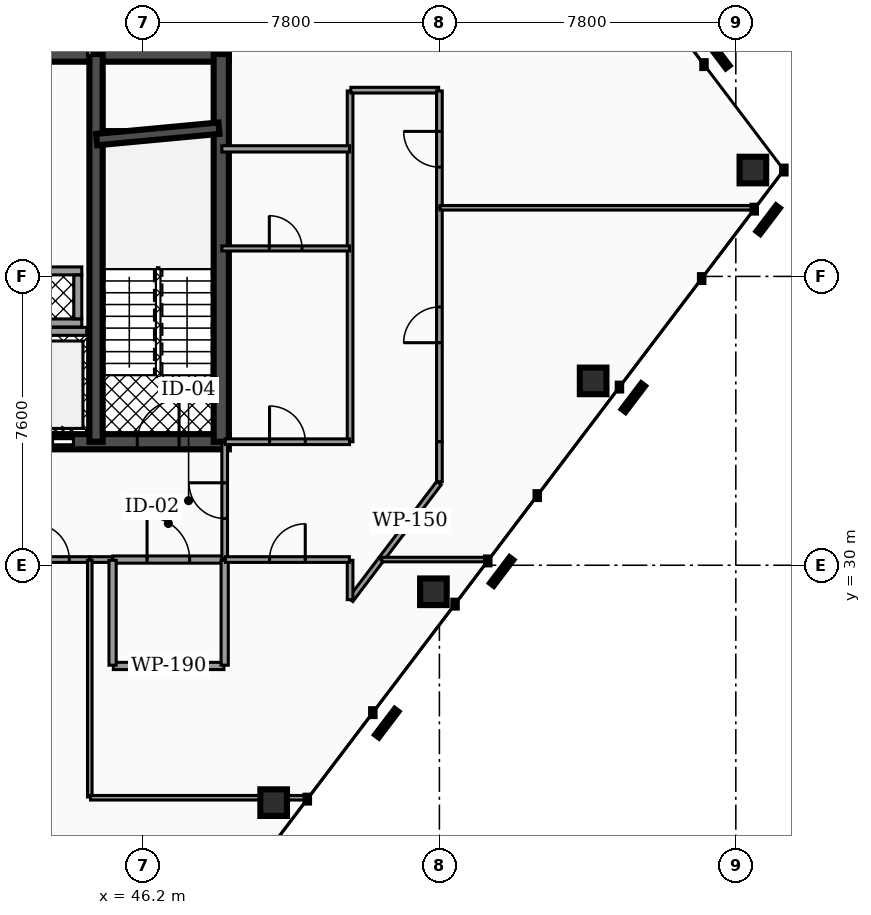
"""IFC4 building model, lengths in metres.
Left out: names, types, materials, properties, quantities, classifications, styles, units other than length and angle.
Written with IfcOpenShell. Run it as: python <this file> out.ifc"""

import sys

from ifc_helpers import new_model, si_unit, direction, frame, frame_2d, origin, origin_2d, place, context, subcontext, project, spatial, rectangle, hollow_rectangle, extrude, element, fill, save


model = new_model("IFC4")
c1 = context("Model", 3, precision=1e-05, world=origin(), true_north=direction((0.0, 1.0)))
c2 = subcontext(c1, "Body", "Model", "MODEL_VIEW")
j1 = project(units=[si_unit("LENGTHUNIT", "METRE"), si_unit("PLANEANGLEUNIT", "RADIAN")], contexts=[c1])
p1 = place(None, origin())
s1 = spatial("IfcSite", under=j1, at=p1, CompositionType="ELEMENT")
p2 = place(p1, origin())
s2 = spatial("IfcBuilding", under=s1, at=p2, CompositionType="ELEMENT")
p3 = place(p2, frame((0.0, 0.0, 183.26)))
s3 = spatial("IfcBuildingStorey", under=s2, at=p3, CompositionType="ELEMENT", Elevation=183.26)
p4 = place(p3, frame((28.4, 43.45, 0.0), z_axis=(0.0, 0.0, 1.0), x_axis=(1.0, 0.0, 0.0)))
e1 = element("IfcWall", 1, at=p4, inside=s3, PredefinedType="SHEAR", context=c2, shape_type="SweptSolid", body=[
    extrude(rectangle(XDim=20.06, YDim=0.4, at=frame_2d((10.03, 0.0))), origin(), (0.0, 0.0, 1.0), 3.5),
])
p5 = place(p3, frame((28.4, 33.25, 0.0), z_axis=(0.0, 0.0, 1.0), x_axis=(1.0, 0.0, 0.0)))
e2 = element("IfcWall", 2, at=p5, inside=s3, PredefinedType="SHEAR", context=c2, shape_type="SweptSolid", body=[
    extrude(rectangle(XDim=20.06, YDim=0.4, at=frame_2d((10.03, 0.0))), origin(), (0.0, 0.0, 1.0), 3.5),
])
p6 = place(p5, frame((4.03, 0.0, 0.0)))
e3 = element("IfcOpeningElement", 3, at=p6, cuts=e2, PredefinedType="OPENING", context=c2, shape_type="SweptSolid", body=[
    extrude(rectangle(XDim=1.1, YDim=2.15, at=frame_2d((0.55, 1.075))), frame((0.0, 0.21, 0.0), z_axis=(0.0, -1.0, 0.0), x_axis=(1.0, 0.0, 0.0)), (0.0, 0.0, 1.0), 0.42),
])
p7 = place(p5, frame((14.87, 0.0, 0.0)))
e4 = element("IfcOpeningElement", 4, at=p7, cuts=e2, PredefinedType="OPENING", context=c2, shape_type="SweptSolid", body=[
    extrude(rectangle(XDim=1.1, YDim=2.15, at=frame_2d((0.55, 1.075))), frame((0.0, 0.21, 0.0), z_axis=(0.0, -1.0, 0.0), x_axis=(1.0, 0.0, 0.0)), (0.0, 0.0, 1.0), 0.42),
])
p8 = place(p5, frame((5.95, 0.0, 0.0)))
e5 = element("IfcOpeningElement", 5, at=p8, cuts=e2, PredefinedType="OPENING", context=c2, shape_type="SweptSolid", body=[
    extrude(rectangle(XDim=1.0, YDim=2.1, at=frame_2d((0.5, 1.05))), frame((0.0, 0.21, 0.0), z_axis=(0.0, -1.0, 0.0), x_axis=(1.0, 0.0, 0.0)), (0.0, 0.0, 1.0), 0.42),
])
p9 = place(p5, frame((7.65, 0.0, 0.0)))
e6 = element("IfcOpeningElement", 6, at=p9, cuts=e2, PredefinedType="OPENING", context=c2, shape_type="SweptSolid", body=[
    extrude(rectangle(XDim=1.0, YDim=2.1, at=frame_2d((0.5, 1.05))), frame((0.0, 0.21, 0.0), z_axis=(0.0, -1.0, 0.0), x_axis=(1.0, 0.0, 0.0)), (0.0, 0.0, 1.0), 0.42),
])
p10 = place(p5, frame((1.31, 0.0, 0.0)))
e7 = element("IfcOpeningElement", 7, at=p10, cuts=e2, PredefinedType="OPENING", context=c2, shape_type="SweptSolid", body=[
    extrude(rectangle(XDim=1.1, YDim=2.2, at=frame_2d((0.55, 1.1))), frame((0.0, 0.21, 0.0), z_axis=(0.0, -1.0, 0.0), x_axis=(1.0, 0.0, 0.0)), (0.0, 0.0, 1.0), 0.42),
])
p11 = place(p5, frame((9.44, 0.0, 0.0)))
e8 = element("IfcOpeningElement", 8, at=p11, cuts=e2, PredefinedType="OPENING", context=c2, shape_type="SweptSolid", body=[
    extrude(rectangle(XDim=1.12, YDim=2.05, at=frame_2d((0.56, 1.025))), frame((0.0, 0.21, 0.0), z_axis=(0.0, -1.0, 0.0), x_axis=(1.0, 0.0, 0.0)), (0.0, 0.0, 1.0), 0.42),
])
p12 = place(p5, frame((17.65, 0.0, 0.0)))
e9 = element("IfcOpeningElement", 9, at=p12, cuts=e2, PredefinedType="OPENING", context=c2, shape_type="SweptSolid", body=[
    extrude(rectangle(XDim=1.1, YDim=2.2, at=frame_2d((0.55, 1.1))), frame((0.0, 0.21, 0.0), z_axis=(0.0, -1.0, 0.0), x_axis=(1.0, 0.0, 0.0)), (0.0, 0.0, 1.0), 0.42),
])
p13 = place(p3, frame((44.965, 33.25, 0.0), z_axis=(0.0, 0.0, 1.0), x_axis=(0.0, 1.0, 0.0)))
e10 = element("IfcWall", 10, at=p13, inside=s3, PredefinedType="SHEAR", context=c2, shape_type="SweptSolid", body=[
    extrude(rectangle(XDim=10.2, YDim=0.35, at=frame_2d((5.1, 0.0))), origin(), (0.0, 0.0, 1.0), 3.5),
])
p14 = place(p3, frame((48.26, 33.25, 0.0), z_axis=(0.0, 0.0, 1.0), x_axis=(0.0, 1.0, 0.0)))
e11 = element("IfcWall", 11, at=p14, inside=s3, PredefinedType="SHEAR", context=c2, shape_type="SweptSolid", body=[
    extrude(rectangle(XDim=10.2, YDim=0.4, at=frame_2d((5.1, 0.0))), origin(), (0.0, 0.0, 1.0), 3.5),
])
p15 = place(p3, frame((44.98, 41.2, 0.0), z_axis=(0.0, 0.0, 1.0), x_axis=(0.995686468965, 0.09278176286, 0.0)))
e12 = element("IfcWall", 12, at=p15, inside=s3, PredefinedType="SHEAR", context=c2, shape_type="SweptSolid", body=[
    extrude(rectangle(XDim=3.234, YDim=0.3, at=frame_2d((1.617, 0.0))), origin(), (0.0, 0.0, 1.0), 3.5),
])
p16 = place(p3, frame((49.639, 23.754, 0.0), z_axis=(-0.074246461294, 0.034968136733, 0.996626656476), x_axis=(-0.426082575566, -0.904684275755, 0.0)))
e13 = element("IfcColumn", 13, at=p16, inside=s3, PredefinedType="COLUMN", context=c2, shape_type="SweptSolid", body=[
    extrude(hollow_rectangle(XDim=0.7, YDim=0.7, WallThickness=0.035, at=origin_2d()), origin(), (0.0, 0.0, 1.0), 3.512),
])
p17 = place(p3, frame((53.842, 29.302, 0.0), z_axis=(-0.055061357393, 0.060205979169, 0.99666618634), x_axis=(-0.737931809489, -0.674875280733, 0.0)))
e14 = element("IfcColumn", 14, at=p17, inside=s3, PredefinedType="COLUMN", context=c2, shape_type="SweptSolid", body=[
    extrude(hollow_rectangle(XDim=0.7, YDim=0.7, WallThickness=0.035, at=origin_2d()), origin(), (0.0, 0.0, 1.0), 3.512),
])
p18 = place(p3, frame((58.045, 34.851, 0.0), z_axis=(-0.035907879203, 0.085428803519, 0.995697014026), x_axis=(-0.921875036522, -0.387487312099, 0.0)))
e15 = element("IfcColumn", 15, at=p18, inside=s3, PredefinedType="COLUMN", context=c2, shape_type="SweptSolid", body=[
    extrude(hollow_rectangle(XDim=0.7, YDim=0.7, WallThickness=0.035, at=origin_2d()), origin(), (0.0, 0.0, 1.0), 3.515),
])
p19 = place(p3, frame((62.249, 40.399, 0.0), z_axis=(-0.01670553271, 0.110492195599, 0.993736584759), x_axis=(-0.988762784989, -0.149492993214, 0.0)))
e16 = element("IfcColumn", 16, at=p19, inside=s3, PredefinedType="COLUMN", context=c2, shape_type="SweptSolid", body=[
    extrude(hollow_rectangle(XDim=0.7, YDim=0.7, WallThickness=0.035, at=origin_2d()), origin(), (0.0, 0.0, 1.0), 3.522),
])
p20 = place(p3, frame((42.92, 36.155, 0.0), z_axis=(0.0, 0.0, 1.0), x_axis=(1.0, 0.0, 0.0)))
e17 = element("IfcWall", 17, at=p20, inside=s3, PredefinedType="SOLIDWALL", context=c2, shape_type="SweptSolid", body=[
    extrude(rectangle(XDim=1.8, YDim=0.21, at=frame_2d((0.9, 0.0))), origin(), (0.0, 0.0, 1.0), 2.472),
])
for number, where, z_axis, x_axis in (
    (18, (42.99, 36.375, 0.0), (0.0, 0.0, 1.0), (1.0, 0.0, 0.0)),
    (19, (42.99, 37.745, 0.0), (0.0, 0.0, 1.0), (1.0, 0.0, 0.0)),
):
    element("IfcWall", number, at=place(p3, frame(where, z_axis=z_axis, x_axis=x_axis)), inside=s3, PredefinedType="SOLIDWALL", context=c2, shape_type="SweptSolid", body=[
        extrude(rectangle(XDim=1.6, YDim=0.21, at=frame_2d((0.8, 0.0))), origin(), (0.0, 0.0, 1.0), 3.5),
    ])
p21 = place(p3, frame((44.485, 36.485, 0.0), z_axis=(0.0, 0.0, 1.0), x_axis=(0.0, 1.0, 0.0)))
e20 = element("IfcWall", 20, at=p21, inside=s3, PredefinedType="SOLIDWALL", context=c2, shape_type="SweptSolid", body=[
    extrude(rectangle(XDim=1.15, YDim=0.21, at=frame_2d((0.575, 0.0))), origin(), (0.0, 0.0, 1.0), 3.5),
])
p22 = place(p3, frame((45.405, 30.15, 0.0), z_axis=(0.0, 0.0, 1.0), x_axis=(1.0, 0.0, 0.0)))
e21 = element("IfcWall", 21, at=p22, inside=s3, PredefinedType="PARTITIONING", context=c2, shape_type="SweptSolid", body=[
    extrude(rectangle(XDim=2.925, YDim=0.19, at=frame_2d((1.462, 0.0))), origin(), (0.0, 0.0, 1.0), 2.457),
])
p23 = place(p22, frame((0.903, 0.0, 0.0)))
e22 = element("IfcOpeningElement", 22, at=p23, cuts=e21, PredefinedType="OPENING", context=c2, shape_type="SweptSolid", body=[
    extrude(rectangle(XDim=1.12, YDim=2.05, at=frame_2d((0.56, 1.025))), frame((0.0, 0.105, 0.0), z_axis=(0.0, -1.0, 0.0), x_axis=(1.0, 0.0, 0.0)), (0.0, 0.0, 1.0), 0.21),
])
p24 = place(p3, frame((48.35, 30.17, 0.0), z_axis=(0.0, 0.0, 1.0), x_axis=(0.0, 1.0, 0.0)))
e23 = element("IfcWall", 23, at=p24, inside=s3, PredefinedType="PARTITIONING", context=c2, shape_type="SweptSolid", body=[
    extrude(rectangle(XDim=3.06, YDim=0.15, at=frame_2d((1.53, 0.0))), origin(), (0.0, 0.0, 1.0), 2.457),
])
p25 = place(p24, frame((1.06, 0.0, 0.0)))
e24 = element("IfcOpeningElement", 24, at=p25, cuts=e23, PredefinedType="OPENING", context=c2, shape_type="SweptSolid", body=[
    extrude(rectangle(XDim=0.94, YDim=2.05, at=frame_2d((0.47, 1.025))), frame((0.0, 0.085, 0.0), z_axis=(0.0, -1.0, 0.0), x_axis=(1.0, 0.0, 0.0)), (0.0, 0.0, 1.0), 0.17),
])
p26 = place(p3, frame((35.985, 30.15, 0.0), z_axis=(0.0, 0.0, 1.0), x_axis=(1.0, 0.0, 0.0)))
e25 = element("IfcWall", 25, at=p26, inside=s3, PredefinedType="PARTITIONING", context=c2, shape_type="SweptSolid", body=[
    extrude(rectangle(XDim=8.81, YDim=0.15, at=frame_2d((4.405, 0.0))), origin(), (0.0, 0.0, 1.0), 2.457),
])
p27 = place(p26, frame((7.335, 0.0, 0.0)))
e26 = element("IfcOpeningElement", 26, at=p27, cuts=e25, PredefinedType="OPENING", context=c2, shape_type="SweptSolid", body=[
    extrude(rectangle(XDim=0.94, YDim=2.05, at=frame_2d((0.47, 1.025))), frame((0.0, 0.085, 0.0), z_axis=(0.0, -1.0, 0.0), x_axis=(1.0, 0.0, 0.0)), (0.0, 0.0, 1.0), 0.17),
])
p28 = place(p3, frame((44.805, 30.15, 0.0), z_axis=(0.0, 0.0, 1.0), x_axis=(1.0, 0.0, 0.0)))
e27 = element("IfcWall", 27, at=p28, inside=s3, PredefinedType="PARTITIONING", context=c2, shape_type="SweptSolid", body=[
    extrude(rectangle(XDim=0.59, YDim=0.15, at=frame_2d((0.295, 0.0))), origin(), (0.0, 0.0, 1.0), 2.457),
])
p29 = place(p3, frame((45.42, 27.35, 0.0), z_axis=(0.0, 0.0, 1.0), x_axis=(1.0, 0.0, 0.0)))
e28 = element("IfcWall", 28, at=p29, inside=s3, PredefinedType="PARTITIONING", context=c2, shape_type="SweptSolid", body=[
    extrude(rectangle(XDim=2.91, YDim=0.19, at=frame_2d((1.455, 0.0))), origin(), (0.0, 0.0, 1.0), 2.457),
])
for number, where, z_axis, x_axis in (
    (29, (45.4, 27.37, 0.0), (0.0, 0.0, 1.0), (0.0, 1.0, 0.0)),
    (30, (48.35, 27.37, 0.0), (0.0, 0.0, 1.0), (0.0, 1.0, 0.0)),
):
    element("IfcWall", number, at=place(p3, frame(where, z_axis=z_axis, x_axis=x_axis)), inside=s3, PredefinedType="PARTITIONING", context=c2, shape_type="SweptSolid", body=[
        extrude(rectangle(XDim=2.76, YDim=0.19, at=frame_2d((1.38, 0.0))), origin(), (0.0, 0.0, 1.0), 2.457),
    ])
p30 = place(p3, frame((51.662, 29.091, 0.0), z_axis=(0.0, 0.0, 1.0), x_axis=(0.603847067363, 0.797100193976, 0.0)))
e31 = element("IfcWall", 31, at=p30, inside=s3, PredefinedType="PARTITIONING", context=c2, shape_type="SweptSolid", body=[
    extrude(rectangle(XDim=1.328, YDim=0.15, at=frame_2d((0.664, 0.0))), origin(), (0.0, 0.0, 1.0), 2.457),
])
p31 = place(p3, frame((51.65, 29.095, 0.0), z_axis=(0.0, 0.0, 1.0), x_axis=(0.0, 1.0, 0.0)))
e32 = element("IfcWall", 32, at=p31, inside=s3, PredefinedType="PARTITIONING", context=c2, shape_type="SweptSolid", body=[
    extrude(rectangle(XDim=1.035, YDim=0.15, at=frame_2d((0.518, 0.0))), origin(), (0.0, 0.0, 1.0), 2.457),
])
p32 = place(p3, frame((48.37, 30.15, 0.0), z_axis=(0.0, 0.0, 1.0), x_axis=(1.0, 0.0, 0.0)))
e33 = element("IfcWall", 33, at=p32, inside=s3, PredefinedType="PARTITIONING", context=c2, shape_type="SweptSolid", body=[
    extrude(rectangle(XDim=3.26, YDim=0.15, at=frame_2d((1.63, 0.0))), origin(), (0.0, 0.0, 1.0), 2.457),
])
p33 = place(p32, frame((1.16, 0.0, 0.0)))
e34 = element("IfcOpeningElement", 34, at=p33, cuts=e33, PredefinedType="OPENING", context=c2, shape_type="SweptSolid", body=[
    extrude(rectangle(XDim=0.94, YDim=2.05, at=frame_2d((0.47, 1.025))), frame((0.0, 0.085, 0.0), z_axis=(0.0, -1.0, 0.0), x_axis=(1.0, 0.0, 0.0)), (0.0, 0.0, 1.0), 0.17),
])
p34 = place(p3, frame((54.0, 33.25, 0.0), z_axis=(0.0, 0.0, 1.0), x_axis=(0.0, 1.0, 0.0)))
e35 = element("IfcWall", 35, at=p34, inside=s3, PredefinedType="PARTITIONING", context=c2, shape_type="SweptSolid", body=[
    extrude(rectangle(XDim=6.151, YDim=0.15, at=frame_2d((3.076, 0.0))), origin(), (0.0, 0.0, 1.0), 2.457),
])
p35 = place(p34, frame((2.606, 0.0, 0.0)))
e36 = element("IfcOpeningElement", 36, at=p35, cuts=e35, PredefinedType="OPENING", context=c2, shape_type="SweptSolid", body=[
    extrude(rectangle(XDim=0.94, YDim=2.05, at=frame_2d((0.47, 1.025))), frame((0.0, 0.085, 0.0), z_axis=(0.0, -1.0, 0.0), x_axis=(1.0, 0.0, 0.0)), (0.0, 0.0, 1.0), 0.17),
])
p36 = place(p3, frame((54.0, 32.197, 0.0), z_axis=(0.0, 0.0, 1.0), x_axis=(0.0, 1.0, 0.0)))
e37 = element("IfcWall", 37, at=p36, inside=s3, PredefinedType="PARTITIONING", context=c2, shape_type="SweptSolid", body=[
    extrude(rectangle(XDim=1.053, YDim=0.15, at=frame_2d((0.527, 0.0))), origin(), (0.0, 0.0, 1.0), 2.457),
])
p37 = place(p3, frame((52.468, 30.154, 0.0), z_axis=(0.0, 0.0, 1.0), x_axis=(0.603840884766, 0.797104877594, 0.0)))
e38 = element("IfcWall", 38, at=p37, inside=s3, PredefinedType="PARTITIONING", context=c2, shape_type="SweptSolid", body=[
    extrude(rectangle(XDim=2.518, YDim=0.15, at=frame_2d((1.259, 0.0))), origin(), (0.0, 0.0, 1.0), 2.457),
])
p38 = place(p3, frame((51.65, 33.25, 0.0), z_axis=(0.0, 0.0, 1.0), x_axis=(0.0, 1.0, 0.0)))
e39 = element("IfcWall", 39, at=p38, inside=s3, PredefinedType="PARTITIONING", context=c2, shape_type="SweptSolid", body=[
    extrude(rectangle(XDim=9.23, YDim=0.15, at=frame_2d((4.615, 0.0))), origin(), (0.0, 0.0, 1.0), 2.457),
])
p39 = place(p3, frame((51.67, 42.5, 0.0), z_axis=(0.0, 0.0, 1.0), x_axis=(1.0, 0.0, 0.0)))
e40 = element("IfcWall", 40, at=p39, inside=s3, PredefinedType="PARTITIONING", context=c2, shape_type="SweptSolid", body=[
    extrude(rectangle(XDim=2.31, YDim=0.15, at=frame_2d((1.155, 0.0))), origin(), (0.0, 0.0, 1.0), 2.457),
])
p40 = place(p3, frame((54.0, 39.411, 0.0), z_axis=(0.0, 0.0, 1.0), x_axis=(0.0, 1.0, 0.0)))
e41 = element("IfcWall", 41, at=p40, inside=s3, PredefinedType="PARTITIONING", context=c2, shape_type="SweptSolid", body=[
    extrude(rectangle(XDim=3.069, YDim=0.15, at=frame_2d((1.534, 0.0))), origin(), (0.0, 0.0, 1.0), 2.457),
])
p41 = place(p40, frame((1.064, 0.0, 0.0)))
e42 = element("IfcOpeningElement", 42, at=p41, cuts=e41, PredefinedType="OPENING", context=c2, shape_type="SweptSolid", body=[
    extrude(rectangle(XDim=0.94, YDim=2.05, at=frame_2d((0.47, 1.025))), frame((0.0, 0.085, 0.0), z_axis=(0.0, -1.0, 0.0), x_axis=(1.0, 0.0, 0.0)), (0.0, 0.0, 1.0), 0.17),
])
p42 = place(p3, frame((48.365, 33.25, 0.0), z_axis=(0.0, 0.0, 1.0), x_axis=(1.0, 0.0, 0.0)))
e43 = element("IfcWall", 43, at=p42, inside=s3, PredefinedType="PARTITIONING", context=c2, shape_type="SweptSolid", body=[
    extrude(rectangle(XDim=3.27, YDim=0.15, at=frame_2d((1.635, 0.0))), origin(), (0.0, 0.0, 1.0), 2.457),
])
p43 = place(p42, frame((1.165, 0.0, 0.0)))
e44 = element("IfcOpeningElement", 44, at=p43, cuts=e43, PredefinedType="OPENING", context=c2, shape_type="SweptSolid", body=[
    extrude(rectangle(XDim=0.94, YDim=2.05, at=frame_2d((0.47, 1.025))), frame((0.0, 0.085, 0.0), z_axis=(0.0, -1.0, 0.0), x_axis=(1.0, 0.0, 0.0)), (0.0, 0.0, 1.0), 0.17),
])
p44 = place(p3, frame((44.8, 23.903, 0.0), z_axis=(0.0, 0.0, 1.0), x_axis=(0.0, 1.0, 0.0)))
e45 = element("IfcWall", 45, at=p44, inside=s3, PredefinedType="PARTITIONING", context=c2, shape_type="SweptSolid", body=[
    extrude(rectangle(XDim=6.227, YDim=0.12, at=frame_2d((3.114, 0.0))), origin(), (0.0, 0.0, 1.0), 2.457),
])
p45 = place(p3, frame((44.82, 23.883, 0.0), z_axis=(0.0, 0.0, 1.0), x_axis=(1.0, 0.0, 0.0)))
e46 = element("IfcWall", 46, at=p45, inside=s3, PredefinedType="PARTITIONING", context=c2, shape_type="SweptSolid", body=[
    extrude(rectangle(XDim=5.717, YDim=0.12, at=frame_2d((2.858, 0.0))), origin(), (0.0, 0.0, 1.0), 2.457),
])
p46 = place(p3, frame((44.8, 43.415, 0.0), z_axis=(0.0, 0.0, 1.0), x_axis=(0.0, 1.0, 0.0)))
e47 = element("IfcWall", 47, at=p46, inside=s3, PredefinedType="PARTITIONING", context=c2, shape_type="SweptSolid", body=[
    extrude(rectangle(XDim=3.092, YDim=0.12, at=frame_2d((1.546, 0.0))), origin(), (0.0, 0.0, 1.0), 2.457),
])
p47 = place(p3, frame((52.485, 30.15, 0.0), z_axis=(0.0, 0.0, 1.0), x_axis=(1.0, 0.0, 0.0)))
e48 = element("IfcWall", 48, at=p47, inside=s3, PredefinedType="PARTITIONING", context=c2, shape_type="SweptSolid", body=[
    extrude(rectangle(XDim=2.8, YDim=0.12, at=frame_2d((1.4, 0.0))), origin(), (0.0, 0.0, 1.0), 2.457),
])
p48 = place(p3, frame((54.02, 39.406, 0.0), z_axis=(0.0, 0.0, 1.0), x_axis=(1.0, 0.0, 0.0)))
e49 = element("IfcWall", 49, at=p48, inside=s3, PredefinedType="PARTITIONING", context=c2, shape_type="SweptSolid", body=[
    extrude(rectangle(XDim=8.277, YDim=0.12, at=frame_2d((4.139, 0.0))), origin(), (0.0, 0.0, 1.0), 2.457),
])
p49 = place(p3, frame((48.275, 40.956, 0.0), z_axis=(0.0, 0.0, 1.0), x_axis=(1.0, 0.0, 0.0)))
e50 = element("IfcWall", 50, at=p49, inside=s3, PredefinedType="PARTITIONING", context=c2, shape_type="SweptSolid", body=[
    extrude(rectangle(XDim=3.36, YDim=0.165, at=frame_2d((1.68, 0.0))), origin(), (0.0, 0.0, 1.0), 2.457),
])
p50 = place(p3, frame((48.275, 38.336, 0.0), z_axis=(0.0, 0.0, 1.0), x_axis=(1.0, 0.0, 0.0)))
e51 = element("IfcWall", 51, at=p50, inside=s3, PredefinedType="PARTITIONING", context=c2, shape_type="SweptSolid", body=[
    extrude(rectangle(XDim=3.36, YDim=0.135, at=frame_2d((1.68, 0.0))), origin(), (0.0, 0.0, 1.0), 2.457),
])
p51 = place(p50, frame((1.25, 0.0, 0.0)))
e52 = element("IfcOpeningElement", 52, at=p51, cuts=e51, PredefinedType="OPENING", context=c2, shape_type="SweptSolid", body=[
    extrude(rectangle(XDim=0.86, YDim=2.05, at=frame_2d((0.43, 1.025))), frame((0.0, 0.077, 0.0), z_axis=(0.0, -1.0, 0.0), x_axis=(1.0, 0.0, 0.0)), (0.0, 0.0, 1.0), 0.155),
])
p52 = place(p7, origin())
e53 = element("IfcDoor", 53, at=p52, inside=s3, OperationType="SLIDING_TO_RIGHT", PredefinedType="DOOR", context=c2, shape_type="SweptSolid", body=[
    extrude(rectangle(XDim=1.1, YDim=2.15, at=frame_2d((0.55, 1.075))), frame((0.0, 0.025, 0.0), z_axis=(0.0, -1.0, 0.0), x_axis=(1.0, 0.0, 0.0)), (0.0, 0.0, 1.0), 0.05),
])
fill(e4, e53)
p53 = place(p12, origin())
e54 = element("IfcDoor", 54, at=p53, inside=s3, OperationType="SINGLE_SWING_RIGHT", PredefinedType="DOOR", context=c2, shape_type="SweptSolid", body=[
    extrude(rectangle(XDim=1.1, YDim=2.2, at=frame_2d((0.55, 1.1))), frame((0.0, 0.025, 0.0), z_axis=(0.0, -1.0, 0.0), x_axis=(1.0, 0.0, 0.0)), (0.0, 0.0, 1.0), 0.05),
])
fill(e9, e54)
p54 = place(p23, origin())
e55 = element("IfcDoor", 55, at=p54, inside=s3, OperationType="SINGLE_SWING_LEFT", PredefinedType="DOOR", context=c2, shape_type="SweptSolid", body=[
    extrude(rectangle(XDim=1.12, YDim=2.05, at=frame_2d((0.56, 1.025))), frame((0.0, 0.025, 0.0), z_axis=(0.0, -1.0, 0.0), x_axis=(1.0, 0.0, 0.0)), (0.0, 0.0, 1.0), 0.05),
])
fill(e22, e55)
p55 = place(p25, origin())
e56 = element("IfcDoor", 56, at=p55, inside=s3, OperationType="SINGLE_SWING_RIGHT", PredefinedType="DOOR", context=c2, shape_type="SweptSolid", body=[
    extrude(rectangle(XDim=0.94, YDim=2.05, at=frame_2d((0.47, 1.025))), frame((0.0, 0.025, 0.0), z_axis=(0.0, -1.0, 0.0), x_axis=(1.0, 0.0, 0.0)), (0.0, 0.0, 1.0), 0.05),
])
fill(e24, e56)
p56 = place(p27, origin())
e57 = element("IfcDoor", 57, at=p56, inside=s3, OperationType="SINGLE_SWING_LEFT", PredefinedType="DOOR", context=c2, shape_type="SweptSolid", body=[
    extrude(rectangle(XDim=0.94, YDim=2.05, at=frame_2d((0.47, 1.025))), frame((0.0, 0.025, 0.0), z_axis=(0.0, -1.0, 0.0), x_axis=(1.0, 0.0, 0.0)), (0.0, 0.0, 1.0), 0.05),
])
fill(e26, e57)
p57 = place(p33, origin())
e58 = element("IfcDoor", 58, at=p57, inside=s3, OperationType="SINGLE_SWING_RIGHT", PredefinedType="DOOR", context=c2, shape_type="SweptSolid", body=[
    extrude(rectangle(XDim=0.94, YDim=2.05, at=frame_2d((0.47, 1.025))), frame((0.0, 0.025, 0.0), z_axis=(0.0, -1.0, 0.0), x_axis=(1.0, 0.0, 0.0)), (0.0, 0.0, 1.0), 0.05),
])
fill(e34, e58)
p58 = place(p35, origin())
e59 = element("IfcDoor", 59, at=p58, inside=s3, OperationType="SINGLE_SWING_LEFT", PredefinedType="DOOR", context=c2, shape_type="SweptSolid", body=[
    extrude(rectangle(XDim=0.94, YDim=2.05, at=frame_2d((0.47, 1.025))), frame((0.0, 0.025, 0.0), z_axis=(0.0, -1.0, 0.0), x_axis=(1.0, 0.0, 0.0)), (0.0, 0.0, 1.0), 0.05),
])
fill(e36, e59)
p59 = place(p41, origin())
e60 = element("IfcDoor", 60, at=p59, inside=s3, OperationType="SINGLE_SWING_RIGHT", PredefinedType="DOOR", context=c2, shape_type="SweptSolid", body=[
    extrude(rectangle(XDim=0.94, YDim=2.05, at=frame_2d((0.47, 1.025))), frame((0.0, 0.025, 0.0), z_axis=(0.0, -1.0, 0.0), x_axis=(1.0, 0.0, 0.0)), (0.0, 0.0, 1.0), 0.05),
])
fill(e42, e60)
p60 = place(p43, origin())
e61 = element("IfcDoor", 61, at=p60, inside=s3, OperationType="SINGLE_SWING_LEFT", PredefinedType="DOOR", context=c2, shape_type="SweptSolid", body=[
    extrude(rectangle(XDim=0.94, YDim=2.05, at=frame_2d((0.47, 1.025))), frame((0.0, 0.025, 0.0), z_axis=(0.0, -1.0, 0.0), x_axis=(1.0, 0.0, 0.0)), (0.0, 0.0, 1.0), 0.05),
])
fill(e44, e61)
p61 = place(p51, origin())
e62 = element("IfcDoor", 62, at=p61, inside=s3, OperationType="SINGLE_SWING_LEFT", PredefinedType="DOOR", context=c2, shape_type="SweptSolid", body=[
    extrude(rectangle(XDim=0.86, YDim=2.05, at=frame_2d((0.43, 1.025))), frame((0.0, 0.025, 0.0), z_axis=(0.0, -1.0, 0.0), x_axis=(1.0, 0.0, 0.0)), (0.0, 0.0, 1.0), 0.05),
])
fill(e52, e62)
save(model, sys.argv[1])
